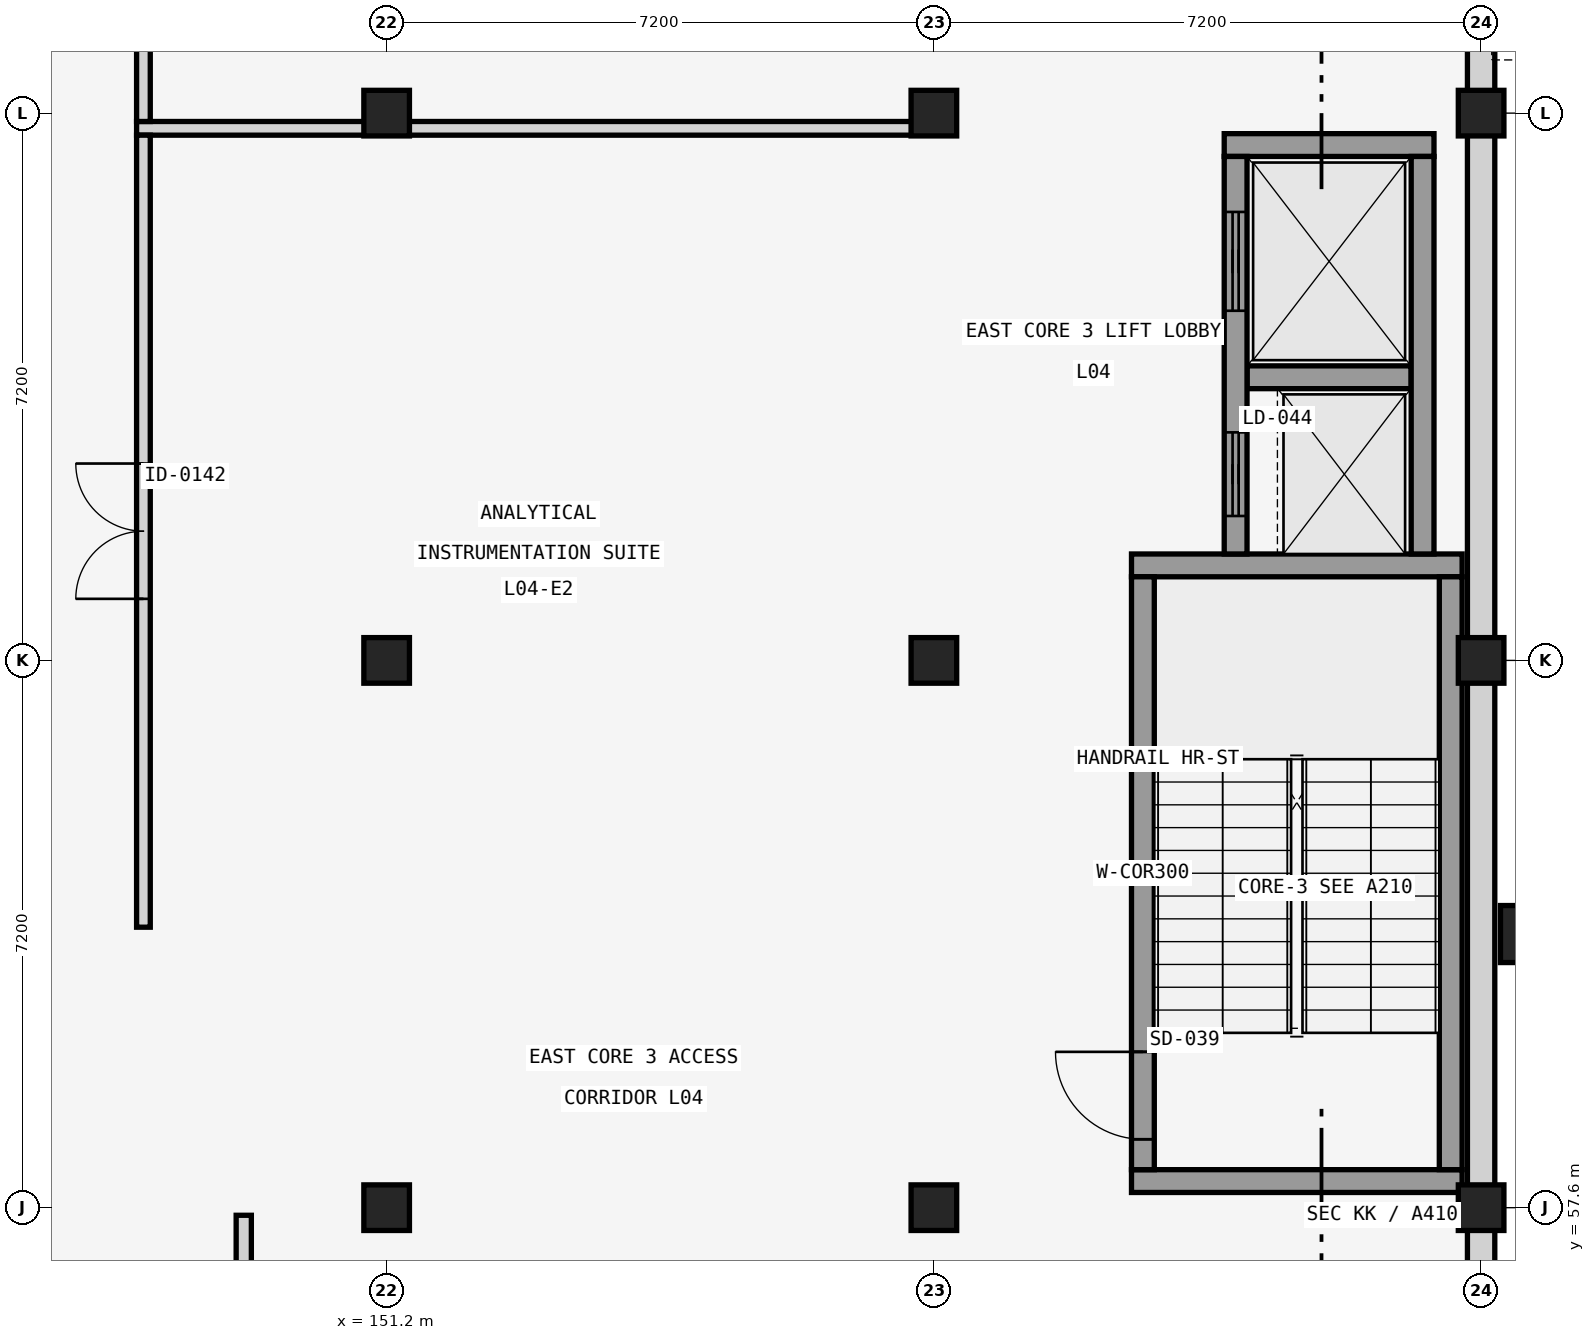
"""IFC4 building model, lengths in metres.
Left out: names, types, materials, properties, quantities, classifications, styles, units other than length and angle.
Written with IfcOpenShell. Run it as: python <this file> out.ifc"""

import sys

from ifc_helpers import new_model, si_unit, direction, frame, frame_2d, origin, origin_2d, place, context, subcontext, project, spatial, rectangle, extrude, element, fill, save


model = new_model("IFC4")
c1 = context("Model", 3, precision=1e-05, world=origin(), true_north=direction((0.0, 1.0)))
c2 = subcontext(c1, "Body", "Model", "MODEL_VIEW")
j1 = project(units=[si_unit("LENGTHUNIT", "METRE"), si_unit("PLANEANGLEUNIT", "RADIAN")], contexts=[c1])
p1 = place(None, origin())
s1 = spatial("IfcSite", under=j1, at=p1, CompositionType="ELEMENT")
p2 = place(p1, origin())
s2 = spatial("IfcBuilding", under=s1, at=p2, CompositionType="ELEMENT")
p3 = place(p2, frame((0.0, 0.0, 17.28)))
s3 = spatial("IfcBuildingStorey", under=s2, at=p3, CompositionType="ELEMENT", Elevation=17.28)
for number, where, z_axis, x_axis in (
    (1, (151.2, 57.6, 0.0), (0.0, 0.0, 1.0), (1.0, 0.0, 0.0)),
    (2, (151.2, 64.8, 0.0), (0.0, 0.0, 1.0), (1.0, 0.0, 0.0)),
    (3, (151.2, 72.0, 0.0), (0.0, 0.0, 1.0), (1.0, 0.0, 0.0)),
    (4, (158.4, 57.6, 0.0), (0.0, 0.0, 1.0), (1.0, 0.0, 0.0)),
    (5, (158.4, 64.8, 0.0), (0.0, 0.0, 1.0), (1.0, 0.0, 0.0)),
    (6, (158.4, 72.0, 0.0), (0.0, 0.0, 1.0), (1.0, 0.0, 0.0)),
    (7, (165.6, 57.6, 0.0), (0.0, 0.0, 1.0), (1.0, 0.0, 0.0)),
    (8, (165.6, 64.8, 0.0), (0.0, 0.0, 1.0), (1.0, 0.0, 0.0)),
    (9, (165.6, 72.0, 0.0), (0.0, 0.0, 1.0), (1.0, 0.0, 0.0)),
):
    element("IfcColumn", number, at=place(p3, frame(where, z_axis=z_axis, x_axis=x_axis)), inside=s3, PredefinedType="COLUMN", context=c2, shape_type="SweptSolid", body=[
        extrude(rectangle(XDim=0.6, YDim=0.6, at=origin_2d()), origin(), (0.0, 0.0, 1.0), 4.16),
    ])
p4 = place(p3, frame((166.08, 61.2, 0.0), z_axis=(0.0, 0.0, 1.0), x_axis=(1.0, 0.0, 0.0)))
e10 = element("IfcColumn", 10, at=p4, inside=s3, PredefinedType="PILASTER", context=c2, shape_type="SweptSolid", body=[
    extrude(rectangle(XDim=0.45, YDim=0.75, at=origin_2d()), origin(), (0.0, 0.0, 1.0), 4.16),
])
p5 = place(p3, frame((165.6, 50.69, 0.0), z_axis=(0.0, 0.0, 1.0), x_axis=(0.0, 1.0, 0.0)))
e11 = element("IfcWall", 11, at=p5, inside=s3, PredefinedType="SOLIDWALL", context=c2, shape_type="SweptSolid", body=[
    extrude(rectangle(XDim=6.62, YDim=0.36, at=frame_2d((3.31, 0.0))), origin(), (0.0, 0.0, 1.0), 3.16),
])
p6 = place(p5, frame((1.885, 0.0, 0.95)))
e12 = element("IfcOpeningElement", 12, at=p6, cuts=e11, PredefinedType="OPENING", context=c2, shape_type="SweptSolid", body=[
    extrude(rectangle(XDim=2.85, YDim=1.95, at=frame_2d((1.425, 0.975))), frame((0.0, 0.19, 0.0), z_axis=(0.0, -1.0, 0.0), x_axis=(1.0, 0.0, 0.0)), (0.0, 0.0, 1.0), 0.38),
])
p7 = place(p3, frame((165.6, 57.89, 0.0), z_axis=(0.0, 0.0, 1.0), x_axis=(0.0, 1.0, 0.0)))
e13 = element("IfcWall", 13, at=p7, inside=s3, PredefinedType="SOLIDWALL", context=c2, shape_type="SweptSolid", body=[
    extrude(rectangle(XDim=6.62, YDim=0.36, at=frame_2d((3.31, 0.0))), origin(), (0.0, 0.0, 1.0), 3.16),
])
p8 = place(p3, frame((165.6, 65.09, 0.0), z_axis=(0.0, 0.0, 1.0), x_axis=(0.0, 1.0, 0.0)))
e14 = element("IfcWall", 14, at=p8, inside=s3, PredefinedType="SOLIDWALL", context=c2, shape_type="SweptSolid", body=[
    extrude(rectangle(XDim=6.62, YDim=0.36, at=frame_2d((3.31, 0.0))), origin(), (0.0, 0.0, 1.0), 3.16),
])
p9 = place(p3, frame((165.6, 72.29, 0.0), z_axis=(0.0, 0.0, 1.0), x_axis=(0.0, 1.0, 0.0)))
e15 = element("IfcWall", 15, at=p9, inside=s3, PredefinedType="SOLIDWALL", context=c2, shape_type="SweptSolid", body=[
    extrude(rectangle(XDim=6.62, YDim=0.36, at=frame_2d((3.31, 0.0))), origin(), (0.0, 0.0, 1.0), 3.16),
])
p10 = place(p9, frame((2.11, 0.0, 0.9)))
e16 = element("IfcOpeningElement", 16, at=p10, cuts=e15, PredefinedType="OPENING", context=c2, shape_type="SweptSolid", body=[
    extrude(rectangle(XDim=2.4, YDim=2.1, at=frame_2d((1.2, 1.05))), frame((0.0, 0.19, 0.0), z_axis=(0.0, -1.0, 0.0), x_axis=(1.0, 0.0, 0.0)), (0.0, 0.0, 1.0), 0.38),
])
for number, where, z_axis, x_axis in (
    (17, (161.0, 57.95, 0.0), (0.0, 0.0, 1.0), (1.0, 0.0, 0.0)),
    (18, (161.0, 66.05, 0.0), (0.0, 0.0, 1.0), (1.0, 0.0, 0.0)),
):
    element("IfcWall", number, at=place(p3, frame(where, z_axis=z_axis, x_axis=x_axis)), inside=s3, PredefinedType="SHEAR", context=c2, shape_type="SweptSolid", body=[
        extrude(rectangle(XDim=4.35, YDim=0.3, at=frame_2d((2.175, 0.0))), origin(), (0.0, 0.0, 1.0), 3.81),
    ])
p11 = place(p3, frame((161.15, 58.1, 0.0), z_axis=(0.0, 0.0, 1.0), x_axis=(0.0, 1.0, 0.0)))
e19 = element("IfcWall", 19, at=p11, inside=s3, PredefinedType="SHEAR", context=c2, shape_type="SweptSolid", body=[
    extrude(rectangle(XDim=7.8, YDim=0.3, at=frame_2d((3.9, 0.0))), origin(), (0.0, 0.0, 1.0), 3.81),
])
p12 = place(p11, frame((0.4, 0.0, 0.0)))
e20 = element("IfcOpeningElement", 20, at=p12, cuts=e19, PredefinedType="OPENING", context=c2, shape_type="SweptSolid", body=[
    extrude(rectangle(XDim=1.15, YDim=2.2, at=frame_2d((0.575, 1.1))), frame((0.0, 0.16, 0.0), z_axis=(0.0, -1.0, 0.0), x_axis=(1.0, 0.0, 0.0)), (0.0, 0.0, 1.0), 0.32),
])
p13 = place(p3, frame((165.2, 58.1, 0.0), z_axis=(0.0, 0.0, 1.0), x_axis=(0.0, 1.0, 0.0)))
e21 = element("IfcWall", 21, at=p13, inside=s3, PredefinedType="SHEAR", context=c2, shape_type="SweptSolid", body=[
    extrude(rectangle(XDim=7.8, YDim=0.3, at=frame_2d((3.9, 0.0))), origin(), (0.0, 0.0, 1.0), 3.81),
])
p14 = place(p3, frame((162.22, 71.58, 0.0), z_axis=(0.0, 0.0, 1.0), x_axis=(1.0, 0.0, 0.0)))
e22 = element("IfcWall", 22, at=p14, inside=s3, PredefinedType="SHEAR", context=c2, shape_type="SweptSolid", body=[
    extrude(rectangle(XDim=2.76, YDim=0.3, at=frame_2d((1.38, 0.0))), origin(), (0.0, 0.0, 1.0), 3.81),
])
p15 = place(p3, frame((162.52, 68.525, 0.0), z_axis=(0.0, 0.0, 1.0), x_axis=(1.0, 0.0, 0.0)))
e23 = element("IfcWall", 23, at=p15, inside=s3, PredefinedType="SHEAR", context=c2, shape_type="SweptSolid", body=[
    extrude(rectangle(XDim=2.16, YDim=0.3, at=frame_2d((1.08, 0.0))), origin(), (0.0, 0.0, 1.0), 3.81),
])
p16 = place(p3, frame((162.37, 66.2, 0.0), z_axis=(0.0, 0.0, 1.0), x_axis=(0.0, 1.0, 0.0)))
e24 = element("IfcWall", 24, at=p16, inside=s3, PredefinedType="SHEAR", context=c2, shape_type="SweptSolid", body=[
    extrude(rectangle(XDim=5.23, YDim=0.3, at=frame_2d((2.615, 0.0))), origin(), (0.0, 0.0, 1.0), 3.81),
])
p17 = place(p16, frame((0.5, 0.0, 0.0)))
e25 = element("IfcOpeningElement", 25, at=p17, cuts=e24, PredefinedType="OPENING", context=c2, shape_type="SweptSolid", body=[
    extrude(rectangle(XDim=1.1, YDim=2.2, at=frame_2d((0.55, 1.1))), frame((0.0, 0.16, 0.0), z_axis=(0.0, -1.0, 0.0), x_axis=(1.0, 0.0, 0.0)), (0.0, 0.0, 1.0), 0.32),
])
p18 = place(p16, frame((3.2, 0.0, 0.0)))
e26 = element("IfcOpeningElement", 26, at=p18, cuts=e24, PredefinedType="OPENING", context=c2, shape_type="SweptSolid", body=[
    extrude(rectangle(XDim=1.3, YDim=2.2, at=frame_2d((0.65, 1.1))), frame((0.0, 0.16, 0.0), z_axis=(0.0, -1.0, 0.0), x_axis=(1.0, 0.0, 0.0)), (0.0, 0.0, 1.0), 0.32),
])
p19 = place(p3, frame((164.83, 66.2, 0.0), z_axis=(0.0, 0.0, 1.0), x_axis=(0.0, 1.0, 0.0)))
e27 = element("IfcWall", 27, at=p19, inside=s3, PredefinedType="SHEAR", context=c2, shape_type="SweptSolid", body=[
    extrude(rectangle(XDim=5.23, YDim=0.3, at=frame_2d((2.615, 0.0))), origin(), (0.0, 0.0, 1.0), 3.81),
])
p20 = place(p3, frame((149.32, 36.16, 0.0), z_axis=(0.0, 0.0, 1.0), x_axis=(0.0, 1.0, 0.0)))
e28 = element("IfcWall", 28, at=p20, inside=s3, PredefinedType="PARTITIONING", context=c2, shape_type="SweptSolid", body=[
    extrude(rectangle(XDim=21.34, YDim=0.2, at=frame_2d((10.67, 0.0))), origin(), (0.0, 0.0, 1.0), 3.16),
])
p21 = place(p20, frame((9.81, 0.0, 0.0)))
e29 = element("IfcOpeningElement", 29, at=p21, cuts=e28, PredefinedType="OPENING", context=c2, shape_type="SweptSolid", body=[
    extrude(rectangle(XDim=1.72, YDim=2.26, at=frame_2d((0.86, 1.13))), frame((0.0, 0.11, 0.0), z_axis=(0.0, -1.0, 0.0), x_axis=(1.0, 0.0, 0.0)), (0.0, 0.0, 1.0), 0.22),
])
p22 = place(p3, frame((147.91, 71.8, 0.0), z_axis=(0.0, 0.0, 1.0), x_axis=(1.0, 0.0, 0.0)))
e30 = element("IfcWall", 30, at=p22, inside=s3, PredefinedType="PARTITIONING", context=c2, shape_type="SweptSolid", body=[
    extrude(rectangle(XDim=10.58, YDim=0.18, at=frame_2d((5.29, 0.0))), origin(), (0.0, 0.0, 1.0), 3.16),
])
p23 = place(p3, frame((148.0, 61.29, 0.0), z_axis=(0.0, 0.0, 1.0), x_axis=(0.0, 1.0, 0.0)))
e31 = element("IfcWall", 31, at=p23, inside=s3, PredefinedType="PARTITIONING", context=c2, shape_type="SweptSolid", body=[
    extrude(rectangle(XDim=10.42, YDim=0.18, at=frame_2d((5.21, 0.0))), origin(), (0.0, 0.0, 1.0), 3.16),
])
p24 = place(p23, frame((4.32, 0.0, 0.0)))
e32 = element("IfcOpeningElement", 32, at=p24, cuts=e31, PredefinedType="OPENING", context=c2, shape_type="SweptSolid", body=[
    extrude(rectangle(XDim=1.78, YDim=2.26, at=frame_2d((0.89, 1.13))), frame((0.0, 0.1, 0.0), z_axis=(0.0, -1.0, 0.0), x_axis=(1.0, 0.0, 0.0)), (0.0, 0.0, 1.0), 0.2),
])
p25 = place(p3, frame((148.0, 71.89, 0.0), z_axis=(0.0, 0.0, 1.0), x_axis=(0.0, 1.0, 0.0)))
e33 = element("IfcWall", 33, at=p25, inside=s3, PredefinedType="PARTITIONING", context=c2, shape_type="SweptSolid", body=[
    extrude(rectangle(XDim=21.62, YDim=0.18, at=frame_2d((10.81, 0.0))), origin(), (0.0, 0.0, 1.0), 3.16),
])
p26 = place(p25, frame((9.89, 0.0, 0.0)))
e34 = element("IfcOpeningElement", 34, at=p26, cuts=e33, PredefinedType="OPENING", context=c2, shape_type="SweptSolid", body=[
    extrude(rectangle(XDim=1.84, YDim=2.26, at=frame_2d((0.92, 1.13))), frame((0.0, 0.1, 0.0), z_axis=(0.0, -1.0, 0.0), x_axis=(1.0, 0.0, 0.0)), (0.0, 0.0, 1.0), 0.2),
])
p27 = place(p12, frame((1.15, 0.0, 0.0), z_axis=(0.0, 0.0, 1.0), x_axis=(-1.0, 0.0, 0.0)))
e35 = element("IfcDoor", 35, at=p27, inside=s3, OperationType="SINGLE_SWING_RIGHT", PredefinedType="DOOR", context=c2, shape_type="SweptSolid", body=[
    extrude(rectangle(XDim=1.15, YDim=2.2, at=frame_2d((0.575, 1.1))), frame((0.0, 0.025, 0.0), z_axis=(0.0, -1.0, 0.0), x_axis=(1.0, 0.0, 0.0)), (0.0, 0.0, 1.0), 0.05),
])
fill(e20, e35)
p28 = place(p17, origin())
e36 = element("IfcDoor", 36, at=p28, inside=s3, OperationType="SLIDING_TO_LEFT", PredefinedType="DOOR", context=c2, shape_type="SweptSolid", body=[
    extrude(rectangle(XDim=1.1, YDim=2.2, at=frame_2d((0.55, 1.1))), frame((0.0, 0.025, 0.0), z_axis=(0.0, -1.0, 0.0), x_axis=(1.0, 0.0, 0.0)), (0.0, 0.0, 1.0), 0.05),
])
fill(e25, e36)
p29 = place(p18, origin())
e37 = element("IfcDoor", 37, at=p29, inside=s3, OperationType="SLIDING_TO_LEFT", PredefinedType="DOOR", context=c2, shape_type="SweptSolid", body=[
    extrude(rectangle(XDim=1.3, YDim=2.2, at=frame_2d((0.65, 1.1))), frame((0.0, 0.025, 0.0), z_axis=(0.0, -1.0, 0.0), x_axis=(1.0, 0.0, 0.0)), (0.0, 0.0, 1.0), 0.05),
])
fill(e26, e37)
p30 = place(p24, origin())
e38 = element("IfcDoor", 38, at=p30, inside=s3, OperationType="DOUBLE_DOOR_SINGLE_SWING", PredefinedType="DOOR", context=c2, shape_type="SweptSolid", body=[
    extrude(rectangle(XDim=1.78, YDim=2.26, at=frame_2d((0.89, 1.13))), frame((0.0, 0.025, 0.0), z_axis=(0.0, -1.0, 0.0), x_axis=(1.0, 0.0, 0.0)), (0.0, 0.0, 1.0), 0.05),
])
fill(e32, e38)
save(model, sys.argv[1])
